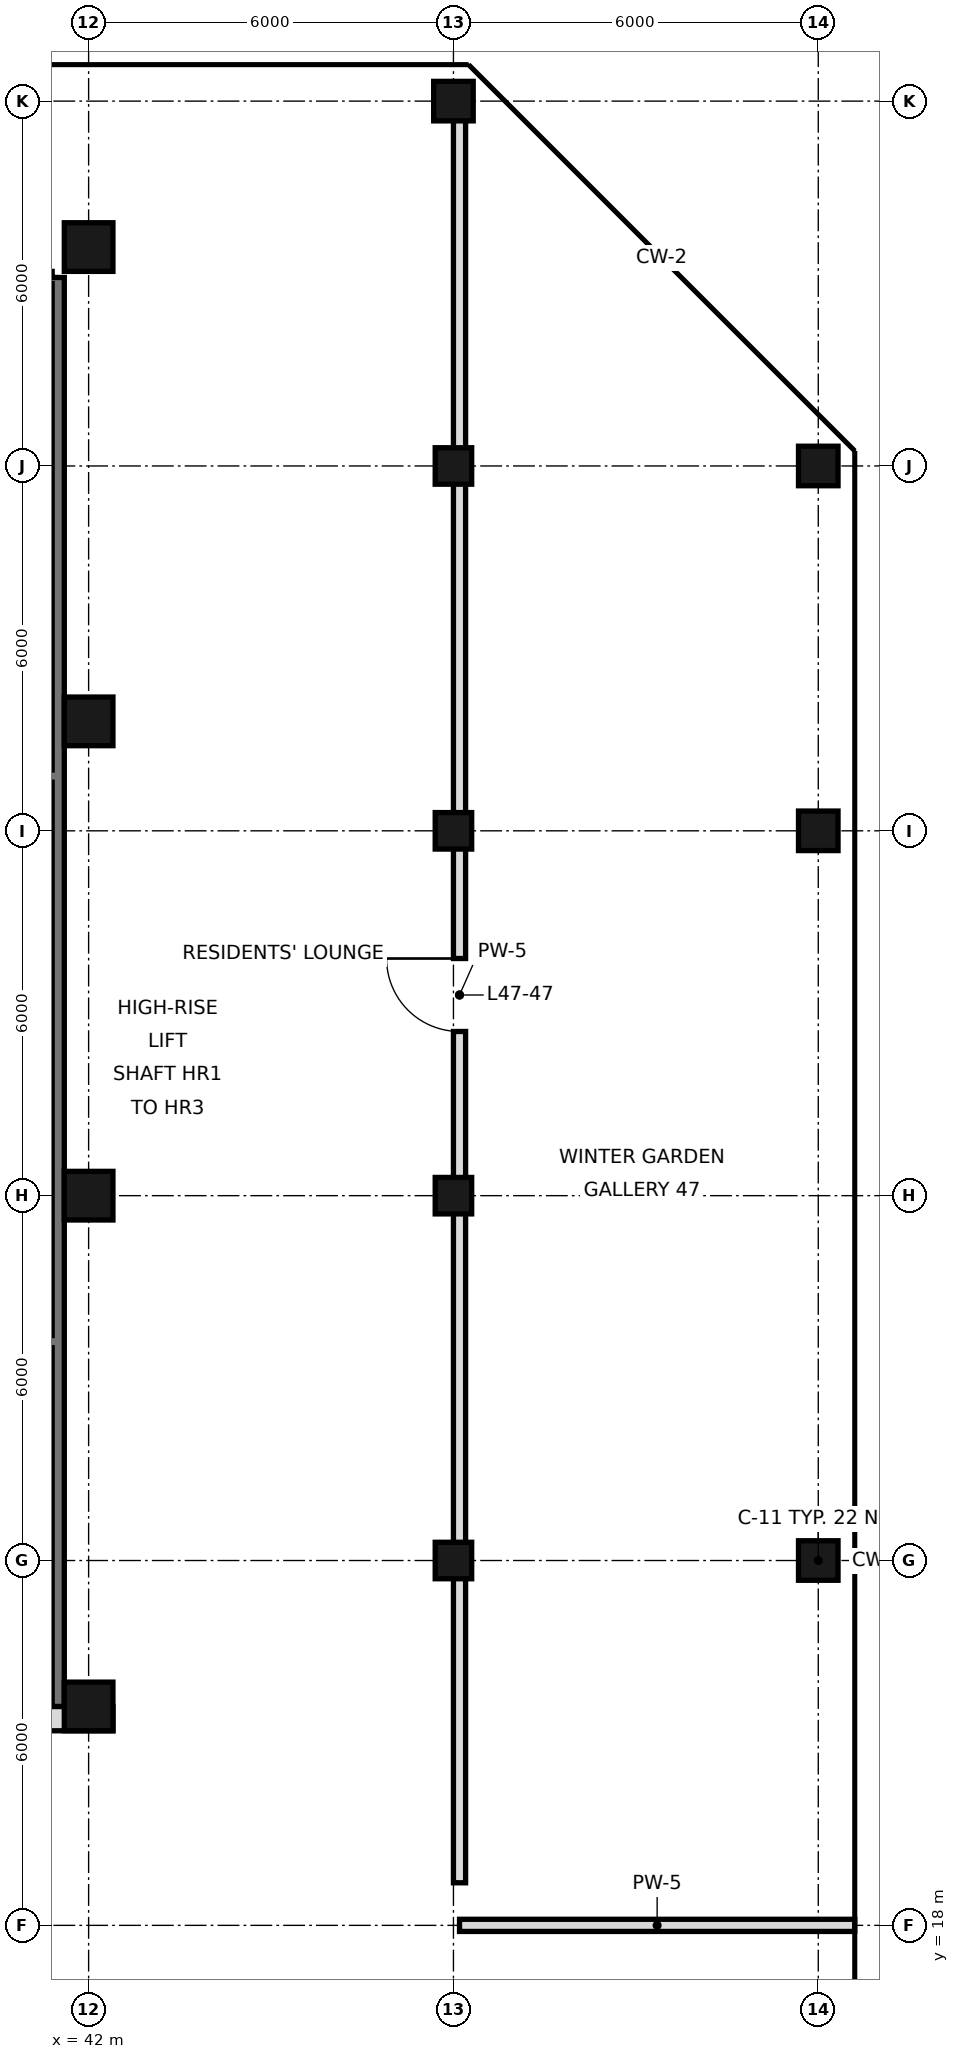
"""IFC4 building model, lengths in metres.
Left out: names, types, materials, properties, quantities, classifications, styles, units other than length and angle.
Written with IfcOpenShell. Run it as: python <this file> out.ifc"""

import sys

from ifc_helpers import new_model, si_unit, direction, frame, frame_2d, origin, origin_2d, place, context, subcontext, project, spatial, rectangle, hollow_rectangle, extrude, element, fill, save


model = new_model("IFC4")
c1 = context("Model", 3, precision=1e-05, world=origin(), true_north=direction((0.0, 1.0)))
c2 = subcontext(c1, "Body", "Model", "MODEL_VIEW")
j1 = project(units=[si_unit("LENGTHUNIT", "METRE"), si_unit("PLANEANGLEUNIT", "RADIAN")], contexts=[c1])
p1 = place(None, origin())
s1 = spatial("IfcSite", under=j1, at=p1, CompositionType="ELEMENT")
p2 = place(p1, origin())
s2 = spatial("IfcBuilding", under=s1, at=p2, CompositionType="ELEMENT")
p3 = place(p2, frame((0.0, 0.0, 202.8)))
s3 = spatial("IfcBuildingStorey", under=s2, at=p3, CompositionType="ELEMENT", Elevation=202.8)
for number, where, z_axis, x_axis in (
    (1, (42.0, 21.6, 0.0), (0.0, 0.0, 1.0), (1.0, 0.0, 0.0)),
    (2, (42.0, 30.0, 0.0), (0.0, 0.0, 1.0), (1.0, 0.0, 0.0)),
    (3, (42.0, 37.8, 0.0), (0.0, 0.0, 1.0), (1.0, 0.0, 0.0)),
    (4, (42.0, 45.6, 0.0), (0.0, 0.0, 1.0), (1.0, 0.0, 0.0)),
):
    element("IfcColumn", number, at=place(p3, frame(where, z_axis=z_axis, x_axis=x_axis)), inside=s3, PredefinedType="COLUMN", context=c2, shape_type="SweptSolid", body=[
        extrude(hollow_rectangle(XDim=0.8, YDim=0.8, WallThickness=0.04, at=origin_2d()), origin(), (0.0, 0.0, 1.0), 3.6),
    ])
for number, where, z_axis, x_axis in (
    (5, (48.0, 24.0, 0.0), (0.0, 0.0, 1.0), (1.0, 0.0, 0.0)),
    (6, (48.0, 30.0, 0.0), (0.0, 0.0, 1.0), (1.0, 0.0, 0.0)),
    (7, (48.0, 36.0, 0.0), (0.0, 0.0, 1.0), (1.0, 0.0, 0.0)),
    (8, (48.0, 42.0, 0.0), (0.0, 0.0, 1.0), (1.0, 0.0, 0.0)),
):
    element("IfcColumn", number, at=place(p3, frame(where, z_axis=z_axis, x_axis=x_axis)), inside=s3, PredefinedType="COLUMN", context=c2, shape_type="SweptSolid", body=[
        extrude(hollow_rectangle(XDim=0.6, YDim=0.6, WallThickness=0.028, at=origin_2d()), origin(), (0.0, 0.0, 1.0), 3.6),
    ])
for number, where, z_axis, x_axis in (
    (9, (48.0, 48.0, 0.0), (0.0, 0.0, 1.0), (1.0, 0.0, 0.0)),
    (10, (54.0, 24.0, 0.0), (0.0, 0.0, 1.0), (1.0, 0.0, 0.0)),
    (11, (54.0, 36.0, 0.0), (0.0, 0.0, 1.0), (1.0, 0.0, 0.0)),
    (12, (54.0, 42.0, 0.0), (0.0, 0.0, 1.0), (1.0, 0.0, 0.0)),
):
    element("IfcColumn", number, at=place(p3, frame(where, z_axis=z_axis, x_axis=x_axis)), inside=s3, PredefinedType="COLUMN", context=c2, shape_type="SweptSolid", body=[
        extrude(hollow_rectangle(XDim=0.65, YDim=0.65, WallThickness=0.032, at=origin_2d()), origin(), (0.0, 0.0, 1.0), 3.6),
    ])
p4 = place(p3, frame((48.1, 18.7, 0.0), z_axis=(0.0, 0.0, 1.0), x_axis=(0.0, 1.0, 0.0)))
e13 = element("IfcWall", 13, at=p4, inside=s3, PredefinedType="SOLIDWALL", context=c2, shape_type="SweptSolid", body=[
    extrude(rectangle(XDim=29.2, YDim=0.2, at=frame_2d((14.6, 0.0))), origin(), (0.0, 0.0, 1.0), 2.72),
])
p5 = place(p4, frame((14.0, 0.0, 0.0)))
e14 = element("IfcOpeningElement", 14, at=p5, cuts=e13, PredefinedType="OPENING", context=c2, shape_type="SweptSolid", body=[
    extrude(rectangle(XDim=1.2, YDim=2.4, at=frame_2d((0.6, 1.2))), frame((0.0, 0.11, 0.0), z_axis=(0.0, -1.0, 0.0), x_axis=(1.0, 0.0, 0.0)), (0.0, 0.0, 1.0), 0.22),
])
p6 = place(p3, frame((48.1, 18.0, 0.0), z_axis=(0.0, 0.0, 1.0), x_axis=(1.0, 0.0, 0.0)))
e15 = element("IfcWall", 15, at=p6, inside=s3, PredefinedType="SOLIDWALL", context=c2, shape_type="SweptSolid", body=[
    extrude(rectangle(XDim=6.5, YDim=0.2, at=frame_2d((3.25, 0.0))), origin(), (0.0, 0.0, 1.0), 2.72),
])
p7 = place(p3, frame((41.5, 21.6, 0.0), z_axis=(0.0, 0.0, 1.0), x_axis=(0.0, 1.0, 0.0)))
e16 = element("IfcWall", 16, at=p7, inside=s3, PredefinedType="SOLIDWALL", context=c2, shape_type="SweptSolid", body=[
    extrude(rectangle(XDim=23.5, YDim=0.2, at=frame_2d((11.75, 0.0))), origin(), (0.0, 0.0, 1.0), 3.42),
])
p8 = place(p3, frame((5.6, 21.4, 0.0), z_axis=(0.0, 0.0, 1.0), x_axis=(1.0, 0.0, 0.0)))
e17 = element("IfcWall", 17, at=p8, inside=s3, PredefinedType="SOLIDWALL", context=c2, shape_type="SweptSolid", body=[
    extrude(rectangle(XDim=36.8, YDim=0.4, at=frame_2d((18.4, 0.0))), origin(), (0.0, 0.0, 1.0), 3.42),
])
p9 = place(p8, frame((8.5, 0.0, 0.0)))
e18 = element("IfcOpeningElement", 18, at=p9, cuts=e17, PredefinedType="OPENING", context=c2, shape_type="SweptSolid", body=[
    extrude(rectangle(XDim=1.8, YDim=2.1, at=frame_2d((0.9, 1.05))), frame((0.0, 0.21, 0.0), z_axis=(0.0, -1.0, 0.0), x_axis=(1.0, 0.0, 0.0)), (0.0, 0.0, 1.0), 0.42),
])
p10 = place(p8, frame((17.5, 0.0, 0.0)))
e19 = element("IfcOpeningElement", 19, at=p10, cuts=e17, PredefinedType="OPENING", context=c2, shape_type="SweptSolid", body=[
    extrude(rectangle(XDim=1.8, YDim=2.1, at=frame_2d((0.9, 1.05))), frame((0.0, 0.21, 0.0), z_axis=(0.0, -1.0, 0.0), x_axis=(1.0, 0.0, 0.0)), (0.0, 0.0, 1.0), 0.42),
])
p11 = place(p8, frame((26.5, 0.0, 0.0)))
e20 = element("IfcOpeningElement", 20, at=p11, cuts=e17, PredefinedType="OPENING", context=c2, shape_type="SweptSolid", body=[
    extrude(rectangle(XDim=1.8, YDim=2.1, at=frame_2d((0.9, 1.05))), frame((0.0, 0.21, 0.0), z_axis=(0.0, -1.0, 0.0), x_axis=(1.0, 0.0, 0.0)), (0.0, 0.0, 1.0), 0.42),
])
p12 = place(p8, frame((4.5, 0.0, 0.0)))
e21 = element("IfcOpeningElement", 21, at=p12, cuts=e17, PredefinedType="OPENING", context=c2, shape_type="SweptSolid", body=[
    extrude(rectangle(XDim=1.2, YDim=2.1, at=frame_2d((0.6, 1.05))), frame((0.0, 0.21, 0.0), z_axis=(0.0, -1.0, 0.0), x_axis=(1.0, 0.0, 0.0)), (0.0, 0.0, 1.0), 0.42),
])
p13 = place(p8, frame((31.1, 0.0, 0.0)))
e22 = element("IfcOpeningElement", 22, at=p13, cuts=e17, PredefinedType="OPENING", context=c2, shape_type="SweptSolid", body=[
    extrude(rectangle(XDim=1.2, YDim=2.1, at=frame_2d((0.6, 1.05))), frame((0.0, 0.21, 0.0), z_axis=(0.0, -1.0, 0.0), x_axis=(1.0, 0.0, 0.0)), (0.0, 0.0, 1.0), 0.42),
])
p14 = place(p3, frame((38.7, 36.9, 0.0), z_axis=(0.0, 0.0, 1.0), x_axis=(1.0, 0.0, 0.0)))
e23 = element("IfcWall", 23, at=p14, inside=s3, PredefinedType="SOLIDWALL", context=c2, shape_type="SweptSolid", body=[
    extrude(rectangle(XDim=2.7, YDim=0.2, at=frame_2d((1.35, 0.0))), origin(), (0.0, 0.0, 1.0), 3.42),
])
p15 = place(p5, frame((1.2, 0.0, 0.0), z_axis=(0.0, 0.0, 1.0), x_axis=(-1.0, 0.0, 0.0)))
e24 = element("IfcDoor", 24, at=p15, inside=s3, OperationType="SINGLE_SWING_LEFT", PredefinedType="DOOR", context=c2, shape_type="SweptSolid", body=[
    extrude(rectangle(XDim=1.2, YDim=2.4, at=frame_2d((0.6, 1.2))), frame((0.0, 0.025, 0.0), z_axis=(0.0, -1.0, 0.0), x_axis=(1.0, 0.0, 0.0)), (0.0, 0.0, 1.0), 0.05),
])
fill(e14, e24)
save(model, sys.argv[1])
